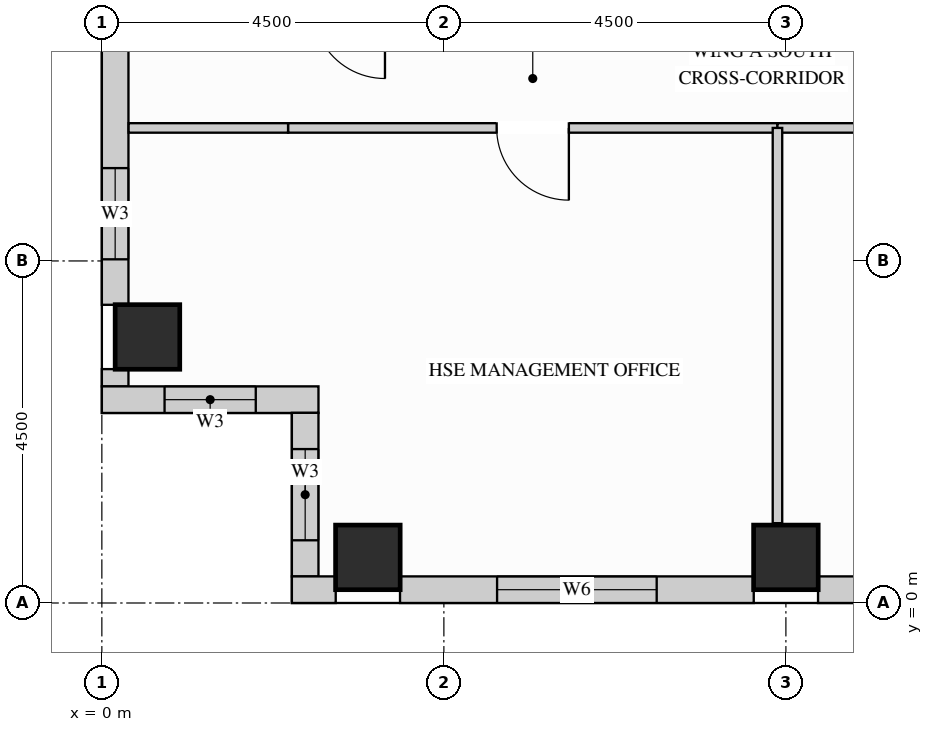
"""IFC4 building model, lengths in metres.
Left out: names, types, materials, properties, quantities, classifications, styles, units other than length and angle.
Written with IfcOpenShell. Run it as: python <this file> out.ifc"""

import sys

from ifc_helpers import new_model, si_unit, direction, frame, frame_2d, origin, origin_2d, place, context, subcontext, project, spatial, rectangle, extrude, source, transform, mapped, element, fill, save


model = new_model("IFC4")
c1 = context("Model", 3, precision=1e-05, world=origin(), true_north=direction((0.0, 1.0)))
c2 = subcontext(c1, "Body", "Model", "MODEL_VIEW")
j1 = project(units=[si_unit("LENGTHUNIT", "METRE"), si_unit("PLANEANGLEUNIT", "RADIAN")], contexts=[c1])
p1 = place(None, origin())
s1 = spatial("IfcSite", under=j1, at=p1, CompositionType="ELEMENT")
p2 = place(p1, origin())
s2 = spatial("IfcBuilding", under=s1, at=p2, CompositionType="ELEMENT")
p3 = place(p2, frame((0.0, 0.0, 248.4)))
s3 = spatial("IfcBuildingStorey", under=s2, at=p3, CompositionType="ELEMENT", Elevation=248.4)
m1 = source(origin(), c2, "Body", "SweptSolid", [
    extrude(rectangle(XDim=0.85, YDim=0.85, at=origin_2d()), origin(), (0.0, 0.0, 1.0), 3.4),
])
for number, where, z_axis, x_axis in (
    (1, (3.5, 0.6, 0.0), (0.0, 0.0, 1.0), (1.0, 0.0, 0.0)),
    (2, (9.0, 0.6, 0.0), (0.0, 0.0, 1.0), (1.0, 0.0, 0.0)),
    (3, (0.6, 3.5, 0.0), (0.0, 0.0, 1.0), (1.0, 0.0, 0.0)),
):
    element("IfcColumn", number, at=place(p3, frame(where, z_axis=z_axis, x_axis=x_axis)), inside=s3, PredefinedType="COLUMN", context=c2, shape_type="MappedRepresentation", body=[
        mapped(m1, transform((0.0, 0.0, 0.0), x_axis=(1.0, 0.0, 0.0), y_axis=(0.0, 1.0, 0.0), z_axis=(0.0, 0.0, 1.0))),
    ])
p4 = place(p3, frame((0.175, 8.077, 0.0), z_axis=(0.0, 0.0, 1.0), x_axis=(0.0, -1.0, 0.0)))
e4 = element("IfcWall", 4, at=p4, inside=s3, PredefinedType="SOLIDWALL", context=c2, shape_type="SweptSolid", body=[
    extrude(rectangle(XDim=4.154, YDim=0.35, at=frame_2d((2.077, 0.0))), origin(), (0.0, 0.0, 1.0), 3.385),
])
p5 = place(p4, frame((2.355, 0.0, 0.78)))
e5 = element("IfcOpeningElement", 5, at=p5, cuts=e4, PredefinedType="OPENING", context=c2, shape_type="SweptSolid", body=[
    extrude(rectangle(XDim=1.2, YDim=2.25, at=frame_2d((0.6, 1.125))), frame((0.0, 0.185, 0.0), z_axis=(0.0, -1.0, 0.0), x_axis=(1.0, 0.0, 0.0)), (0.0, 0.0, 1.0), 0.37),
])
m2 = source(origin(), c2, "Body", "SweptSolid", [
    extrude(rectangle(XDim=0.229, YDim=0.35, at=frame_2d((0.115, 0.0))), origin(), (0.0, 0.0, 1.0), 3.385),
])
p6 = place(p3, frame((0.175, 3.077, 0.0), z_axis=(0.0, 0.0, 1.0), x_axis=(0.0, -1.0, 0.0)))
e6 = element("IfcWall", 6, at=p6, inside=s3, PredefinedType="SOLIDWALL", context=c2, shape_type="MappedRepresentation", body=[
    mapped(m2, transform((0.0, 0.0, 0.0), x_axis=(1.0, 0.0, 0.0), y_axis=(0.0, 1.0, 0.0), z_axis=(0.0, 0.0, 1.0))),
])
p7 = place(p3, frame((0.0, 2.675, 0.0), z_axis=(0.0, 0.0, 1.0), x_axis=(1.0, 0.0, 0.0)))
e7 = element("IfcWall", 7, at=p7, inside=s3, PredefinedType="SOLIDWALL", context=c2, shape_type="SweptSolid", body=[
    extrude(rectangle(XDim=2.85, YDim=0.35, at=frame_2d((1.425, 0.0))), origin(), (0.0, 0.0, 1.0), 3.385),
])
p8 = place(p7, frame((0.825, 0.0, 0.78)))
e8 = element("IfcOpeningElement", 8, at=p8, cuts=e7, PredefinedType="OPENING", context=c2, shape_type="SweptSolid", body=[
    extrude(rectangle(XDim=1.2, YDim=2.25, at=frame_2d((0.6, 1.125))), frame((0.0, 0.185, 0.0), z_axis=(0.0, -1.0, 0.0), x_axis=(1.0, 0.0, 0.0)), (0.0, 0.0, 1.0), 0.37),
])
p9 = place(p3, frame((2.675, 2.502, 0.0), z_axis=(0.0, 0.0, 1.0), x_axis=(0.0, -1.0, 0.0)))
e9 = element("IfcWall", 9, at=p9, inside=s3, PredefinedType="SOLIDWALL", context=c2, shape_type="SweptSolid", body=[
    extrude(rectangle(XDim=2.154, YDim=0.35, at=frame_2d((1.077, 0.0))), origin(), (0.0, 0.0, 1.0), 3.385),
])
p10 = place(p9, frame((0.477, 0.0, 0.78)))
e10 = element("IfcOpeningElement", 10, at=p10, cuts=e9, PredefinedType="OPENING", context=c2, shape_type="SweptSolid", body=[
    extrude(rectangle(XDim=1.2, YDim=2.25, at=frame_2d((0.6, 1.125))), frame((0.0, 0.185, 0.0), z_axis=(0.0, -1.0, 0.0), x_axis=(1.0, 0.0, 0.0)), (0.0, 0.0, 1.0), 0.37),
])
m3 = source(origin(), c2, "Body", "SweptSolid", [
    extrude(rectangle(XDim=0.577, YDim=0.35, at=frame_2d((0.289, 0.0))), origin(), (0.0, 0.0, 1.0), 3.385),
])
p11 = place(p3, frame((2.5, 0.175, 0.0), z_axis=(0.0, 0.0, 1.0), x_axis=(1.0, 0.0, 0.0)))
e11 = element("IfcWall", 11, at=p11, inside=s3, PredefinedType="SOLIDWALL", context=c2, shape_type="MappedRepresentation", body=[
    mapped(m3, transform((0.0, 0.0, 0.0), x_axis=(1.0, 0.0, 0.0), y_axis=(0.0, 1.0, 0.0), z_axis=(0.0, 0.0, 1.0))),
])
p12 = place(p3, frame((3.923, 0.175, 0.0), z_axis=(0.0, 0.0, 1.0), x_axis=(1.0, 0.0, 0.0)))
e12 = element("IfcWall", 12, at=p12, inside=s3, PredefinedType="SOLIDWALL", context=c2, shape_type="SweptSolid", body=[
    extrude(rectangle(XDim=4.654, YDim=0.35, at=frame_2d((2.327, 0.0))), origin(), (0.0, 0.0, 1.0), 3.385),
])
p13 = place(p12, frame((1.277, 0.0, 0.78)))
e13 = element("IfcOpeningElement", 13, at=p13, cuts=e12, PredefinedType="OPENING", context=c2, shape_type="SweptSolid", body=[
    extrude(rectangle(XDim=2.1, YDim=2.25, at=frame_2d((1.05, 1.125))), frame((0.0, 0.185, 0.0), z_axis=(0.0, -1.0, 0.0), x_axis=(1.0, 0.0, 0.0)), (0.0, 0.0, 1.0), 0.37),
])
p14 = place(p3, frame((9.423, 0.175, 0.0), z_axis=(0.0, 0.0, 1.0), x_axis=(1.0, 0.0, 0.0)))
e14 = element("IfcWall", 14, at=p14, inside=s3, PredefinedType="SOLIDWALL", context=c2, shape_type="SweptSolid", body=[
    extrude(rectangle(XDim=4.654, YDim=0.35, at=frame_2d((2.327, 0.0))), origin(), (0.0, 0.0, 1.0), 3.385),
])
p15 = place(p14, frame((1.277, 0.0, 0.78)))
e15 = element("IfcOpeningElement", 15, at=p15, cuts=e14, PredefinedType="OPENING", context=c2, shape_type="SweptSolid", body=[
    extrude(rectangle(XDim=2.1, YDim=2.25, at=frame_2d((1.05, 1.125))), frame((0.0, 0.185, 0.0), z_axis=(0.0, -1.0, 0.0), x_axis=(1.0, 0.0, 0.0)), (0.0, 0.0, 1.0), 0.37),
])
p16 = place(p3, frame((2.45, 6.25, 0.0), z_axis=(0.0, 0.0, 1.0), x_axis=(1.0, 0.0, 0.0)))
e16 = element("IfcWall", 16, at=p16, inside=s3, PredefinedType="PARTITIONING", context=c2, shape_type="SweptSolid", body=[
    extrude(rectangle(XDim=6.439, YDim=0.125, at=frame_2d((3.219, 0.0))), origin(), (0.0, 0.0, 1.0), 2.848),
])
p17 = place(p16, frame((2.744, 0.0, 0.0)))
e17 = element("IfcOpeningElement", 17, at=p17, cuts=e16, PredefinedType="OPENING", context=c2, shape_type="SweptSolid", body=[
    extrude(rectangle(XDim=0.95, YDim=2.15, at=frame_2d((0.475, 1.075))), frame((0.0, 0.073, 0.0), z_axis=(0.0, -1.0, 0.0), x_axis=(1.0, 0.0, 0.0)), (0.0, 0.0, 1.0), 0.145),
])
p18 = place(p3, frame((8.889, 6.25, 0.0), z_axis=(0.0, 0.0, 1.0), x_axis=(1.0, 0.0, 0.0)))
e18 = element("IfcWall", 18, at=p18, inside=s3, PredefinedType="PARTITIONING", context=c2, shape_type="SweptSolid", body=[
    extrude(rectangle(XDim=5.627, YDim=0.125, at=frame_2d((2.813, 0.0))), origin(), (0.0, 0.0, 1.0), 2.848),
])
p19 = place(p18, frame((2.338, 0.0, 0.0)))
e19 = element("IfcOpeningElement", 19, at=p19, cuts=e18, PredefinedType="OPENING", context=c2, shape_type="SweptSolid", body=[
    extrude(rectangle(XDim=0.95, YDim=2.15, at=frame_2d((0.475, 1.075))), frame((0.0, 0.073, 0.0), z_axis=(0.0, -1.0, 0.0), x_axis=(1.0, 0.0, 0.0)), (0.0, 0.0, 1.0), 0.145),
])
m4 = source(origin(), c2, "Body", "SweptSolid", [
    extrude(rectangle(XDim=2.098, YDim=0.125, at=frame_2d((1.049, 0.0))), origin(), (0.0, 0.0, 1.0), 2.848),
])
p20 = place(p3, frame((0.352, 6.25, 0.0), z_axis=(0.0, 0.0, 1.0), x_axis=(1.0, 0.0, 0.0)))
e20 = element("IfcWall", 20, at=p20, inside=s3, PredefinedType="PARTITIONING", context=c2, shape_type="MappedRepresentation", body=[
    mapped(m4, transform((0.0, 0.0, 0.0), x_axis=(1.0, 0.0, 0.0), y_axis=(0.0, 1.0, 0.0), z_axis=(0.0, 0.0, 1.0))),
])
m5 = source(origin(), c2, "Body", "SweptSolid", [
    extrude(rectangle(XDim=5.2, YDim=0.125, at=frame_2d((2.6, 0.0))), origin(), (0.0, 0.0, 1.0), 3.385),
])
p21 = place(p3, frame((8.889, 1.05, 0.0), z_axis=(0.0, 0.0, 1.0), x_axis=(0.0, 1.0, 0.0)))
e21 = element("IfcWall", 21, at=p21, inside=s3, PredefinedType="PARTITIONING", context=c2, shape_type="MappedRepresentation", body=[
    mapped(m5, transform((0.0, 0.0, 0.0), x_axis=(1.0, 0.0, 0.0), y_axis=(0.0, 1.0, 0.0), z_axis=(0.0, 0.0, 1.0))),
])
m6 = source(origin(), c2, "Body", "SweptSolid", [
    extrude(rectangle(XDim=0.95, YDim=2.15, at=frame_2d((0.475, 1.075))), frame((0.0, 0.025, 0.0), z_axis=(0.0, -1.0, 0.0), x_axis=(1.0, 0.0, 0.0)), (0.0, 0.0, 1.0), 0.05),
])
p22 = place(p17, origin())
e22 = element("IfcDoor", 22, at=p22, inside=s3, OperationType="SINGLE_SWING_RIGHT", PredefinedType="DOOR", context=c2, shape_type="MappedRepresentation", body=[
    mapped(m6, transform((0.0, 0.0, 0.0), x_axis=(1.0, 0.0, 0.0), y_axis=(0.0, 1.0, 0.0), z_axis=(0.0, 0.0, 1.0))),
])
fill(e17, e22)
m7 = source(origin(), c2, "Body", "SweptSolid", [
    extrude(rectangle(XDim=1.2, YDim=2.25, at=frame_2d((0.6, 1.125))), frame((0.0, 0.03, 0.0), z_axis=(0.0, -1.0, 0.0), x_axis=(1.0, 0.0, 0.0)), (0.0, 0.0, 1.0), 0.06),
])
p23 = place(p5, origin())
e23 = element("IfcWindow", 23, at=p23, inside=s3, PartitioningType="SINGLE_PANEL", PredefinedType="WINDOW", context=c2, shape_type="MappedRepresentation", body=[
    mapped(m7, transform((0.0, 0.0, 0.0), x_axis=(1.0, 0.0, 0.0), y_axis=(0.0, 1.0, 0.0), z_axis=(0.0, 0.0, 1.0))),
])
fill(e5, e23)
p24 = place(p8, origin())
e24 = element("IfcWindow", 24, at=p24, inside=s3, PartitioningType="SINGLE_PANEL", PredefinedType="WINDOW", context=c2, shape_type="MappedRepresentation", body=[
    mapped(m7, transform((0.0, 0.0, 0.0), x_axis=(1.0, 0.0, 0.0), y_axis=(0.0, 1.0, 0.0), z_axis=(0.0, 0.0, 1.0))),
])
fill(e8, e24)
p25 = place(p10, origin())
e25 = element("IfcWindow", 25, at=p25, inside=s3, PartitioningType="SINGLE_PANEL", PredefinedType="WINDOW", context=c2, shape_type="MappedRepresentation", body=[
    mapped(m7, transform((0.0, 0.0, 0.0), x_axis=(1.0, 0.0, 0.0), y_axis=(0.0, 1.0, 0.0), z_axis=(0.0, 0.0, 1.0))),
])
fill(e10, e25)
m8 = source(origin(), c2, "Body", "SweptSolid", [
    extrude(rectangle(XDim=2.1, YDim=2.25, at=frame_2d((1.05, 1.125))), frame((0.0, 0.03, 0.0), z_axis=(0.0, -1.0, 0.0), x_axis=(1.0, 0.0, 0.0)), (0.0, 0.0, 1.0), 0.06),
])
p26 = place(p13, origin())
e26 = element("IfcWindow", 26, at=p26, inside=s3, PartitioningType="SINGLE_PANEL", PredefinedType="WINDOW", context=c2, shape_type="MappedRepresentation", body=[
    mapped(m8, transform((0.0, 0.0, 0.0), x_axis=(1.0, 0.0, 0.0), y_axis=(0.0, 1.0, 0.0), z_axis=(0.0, 0.0, 1.0))),
])
fill(e13, e26)
save(model, sys.argv[1])
